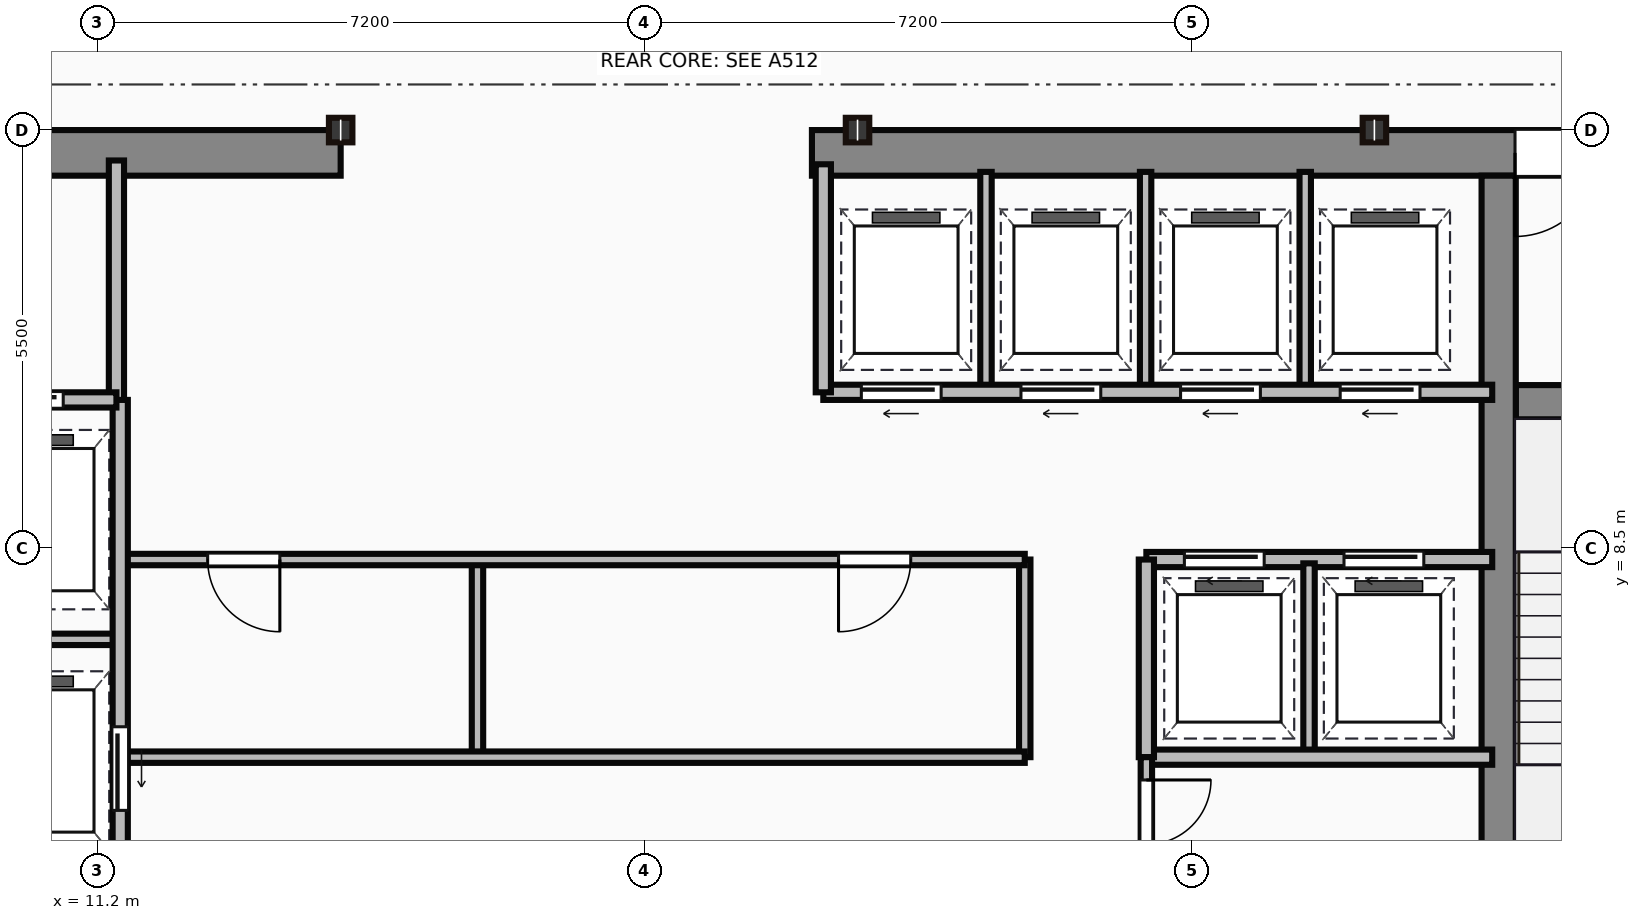
"""IFC4 building model, lengths in metres.
Left out: names, types, materials, properties, quantities, classifications, styles, units other than length and angle.
Written with IfcOpenShell. Run it as: python <this file> out.ifc"""

import sys

from ifc_helpers import new_model, si_unit, direction, frame, frame_2d, origin, origin_2d, place, context, subcontext, project, spatial, rectangle, i_section, extrude, source, transform, mapped, element, fill, save


model = new_model("IFC4")
c1 = context("Model", 3, precision=1e-05, world=origin(), true_north=direction((0.0, 1.0)))
c2 = subcontext(c1, "Body", "Model", "MODEL_VIEW")
j1 = project(units=[si_unit("LENGTHUNIT", "METRE"), si_unit("PLANEANGLEUNIT", "RADIAN")], contexts=[c1])
p1 = place(None, origin())
s1 = spatial("IfcSite", under=j1, at=p1, CompositionType="ELEMENT")
p2 = place(p1, origin())
s2 = spatial("IfcBuilding", under=s1, at=p2, CompositionType="ELEMENT")
p3 = place(p2, frame((0.0, 0.0, 277.05)))
s3 = spatial("IfcBuildingStorey", under=s2, at=p3, CompositionType="ELEMENT", Elevation=277.05)
m1 = source(origin(), c2, "Body", "SweptSolid", [
    extrude(rectangle(XDim=9.1, YDim=0.6, at=frame_2d((4.55, 0.0))), origin(), (0.0, 0.0, 1.0), 3.65),
])
p4 = place(p3, frame((5.3, 13.7, 0.0), z_axis=(0.0, 0.0, 1.0), x_axis=(1.0, 0.0, 0.0)))
e1 = element("IfcWall", 1, at=p4, inside=s3, PredefinedType="SHEAR", context=c2, shape_type="MappedRepresentation", body=[
    mapped(m1, transform((0.0, 0.0, 0.0))),
])
p5 = place(p4, frame((4.1, 0.0, 0.0)))
e2 = element("IfcOpeningElement", 2, at=p5, cuts=e1, PredefinedType="OPENING", context=c2, shape_type="SweptSolid", body=[
    extrude(rectangle(XDim=1.1, YDim=2.15, at=frame_2d((0.55, 1.075))), frame((0.0, 0.31, 0.0), z_axis=(0.0, -1.0, 0.0), x_axis=(1.0, 0.0, 0.0)), (0.0, 0.0, 1.0), 0.62),
])
m2 = source(origin(), c2, "Body", "SweptSolid", [
    extrude(rectangle(XDim=12.6, YDim=0.6, at=frame_2d((6.3, 0.0))), origin(), (0.0, 0.0, 1.0), 3.65),
])
p6 = place(p3, frame((20.6, 13.7, 0.0), z_axis=(0.0, 0.0, 1.0), x_axis=(1.0, 0.0, 0.0)))
e3 = element("IfcWall", 3, at=p6, inside=s3, PredefinedType="SHEAR", context=c2, shape_type="MappedRepresentation", body=[
    mapped(m2, transform((0.0, 0.0, 0.0))),
])
p7 = place(p6, frame((9.25, 0.0, 0.0)))
e4 = element("IfcOpeningElement", 4, at=p7, cuts=e3, PredefinedType="OPENING", context=c2, shape_type="SweptSolid", body=[
    extrude(rectangle(XDim=1.1, YDim=2.15, at=frame_2d((0.55, 1.075))), frame((0.0, 0.31, 0.0), z_axis=(0.0, -1.0, 0.0), x_axis=(1.0, 0.0, 0.0)), (0.0, 0.0, 1.0), 0.62),
])
m3 = source(origin(), c2, "Body", "SweptSolid", [
    extrude(rectangle(XDim=12.5, YDim=0.45, at=frame_2d((6.25, 0.0))), origin(), (0.0, 0.0, 1.0), 3.65),
])
p8 = place(p3, frame((29.635, 0.9, 0.0), z_axis=(0.0, 0.0, 1.0), x_axis=(0.0, 1.0, 0.0)))
e5 = element("IfcWall", 5, at=p8, inside=s3, PredefinedType="SHEAR", context=c2, shape_type="MappedRepresentation", body=[
    mapped(m3, transform((0.0, 0.0, 0.0))),
])
m4 = source(origin(), c2, "Body", "SweptSolid", [
    extrude(rectangle(XDim=3.39, YDim=0.45, at=frame_2d((1.695, 0.0))), origin(), (0.0, 0.0, 1.0), 3.65),
])
p9 = place(p3, frame((29.86, 10.42, 0.0), z_axis=(0.0, 0.0, 1.0), x_axis=(1.0, 0.0, 0.0)))
e6 = element("IfcWall", 6, at=p9, inside=s3, PredefinedType="SHEAR", context=c2, shape_type="MappedRepresentation", body=[
    mapped(m4, transform((0.0, 0.0, 0.0))),
])
p10 = place(p9, frame((1.1, 0.0, 0.0)))
e7 = element("IfcOpeningElement", 7, at=p10, cuts=e6, PredefinedType="OPENING", context=c2, shape_type="SweptSolid", body=[
    extrude(rectangle(XDim=1.1, YDim=2.15, at=frame_2d((0.55, 1.075))), frame((0.0, 0.235, 0.0), z_axis=(0.0, -1.0, 0.0), x_axis=(1.0, 0.0, 0.0)), (0.0, 0.0, 1.0), 0.47),
])
m5 = source(origin(), c2, "Body", "SweptSolid", [
    extrude(i_section(OverallWidth=0.309, OverallDepth=0.323, WebThickness=0.014, FlangeThickness=0.023, at=origin_2d()), origin(), (0.0, 0.0, 1.0), 3.65),
])
for number, where, z_axis, x_axis in (
    (8, (14.4, 14.0, 0.0), (0.0, 0.0, 1.0), (1.0, 0.0, 0.0)),
    (9, (21.2, 14.0, 0.0), (0.0, 0.0, 1.0), (1.0, 0.0, 0.0)),
    (10, (28.0, 14.0, 0.0), (0.0, 0.0, 1.0), (1.0, 0.0, 0.0)),
):
    element("IfcColumn", number, at=place(p3, frame(where, z_axis=z_axis, x_axis=x_axis)), inside=s3, PredefinedType="COLUMN", context=c2, shape_type="MappedRepresentation", body=[
        mapped(m5, transform((0.0, 0.0, 0.0))),
    ])
m6 = source(origin(), c2, "Body", "SweptSolid", [
    extrude(rectangle(XDim=3.18, YDim=0.2, at=frame_2d((1.59, 0.0))), origin(), (0.0, 0.0, 1.0), 3.4),
])
p11 = place(p3, frame((11.45, 10.42, 0.0), z_axis=(0.0, 0.0, 1.0), x_axis=(0.0, 1.0, 0.0)))
e11 = element("IfcWall", 11, at=p11, inside=s3, PredefinedType="PARTITIONING", context=c2, shape_type="MappedRepresentation", body=[
    mapped(m6, transform((0.0, 0.0, 0.0))),
])
m7 = source(origin(), c2, "Body", "SweptSolid", [
    extrude(rectangle(XDim=2.35, YDim=0.2, at=frame_2d((1.175, 0.0))), origin(), (0.0, 0.0, 1.0), 3.4),
])
p12 = place(p3, frame((9.1, 10.45, 0.0), z_axis=(0.0, 0.0, 1.0), x_axis=(1.0, 0.0, 0.0)))
e12 = element("IfcWall", 12, at=p12, inside=s3, PredefinedType="PARTITIONING", context=c2, shape_type="MappedRepresentation", body=[
    mapped(m7, transform((0.0, 0.0, 0.0))),
])
p13 = place(p12, frame((0.55, 0.0, 0.0)))
e13 = element("IfcOpeningElement", 13, at=p13, cuts=e12, PredefinedType="OPENING", context=c2, shape_type="SweptSolid", body=[
    extrude(rectangle(XDim=1.1, YDim=2.15, at=frame_2d((0.55, 1.075))), frame((0.0, 0.11, 0.0), z_axis=(0.0, -1.0, 0.0), x_axis=(1.0, 0.0, 0.0)), (0.0, 0.0, 1.0), 0.22),
])
m8 = source(origin(), c2, "Body", "SweptSolid", [
    extrude(rectangle(XDim=9.6, YDim=0.2, at=frame_2d((4.8, 0.0))), origin(), (0.0, 0.0, 1.0), 3.4),
])
p14 = place(p3, frame((11.5, 0.85, 0.0), z_axis=(0.0, 0.0, 1.0), x_axis=(0.0, 1.0, 0.0)))
e14 = element("IfcWall", 14, at=p14, inside=s3, PredefinedType="PARTITIONING", context=c2, shape_type="MappedRepresentation", body=[
    mapped(m8, transform((0.0, 0.0, 0.0))),
])
p15 = place(p14, frame((4.2, 0.0, 0.0)))
e15 = element("IfcOpeningElement", 15, at=p15, cuts=e14, PredefinedType="OPENING", context=c2, shape_type="SweptSolid", body=[
    extrude(rectangle(XDim=1.1, YDim=2.15, at=frame_2d((0.55, 1.075))), frame((0.0, 0.11, 0.0), z_axis=(0.0, -1.0, 0.0), x_axis=(1.0, 0.0, 0.0)), (0.0, 0.0, 1.0), 0.22),
])
p16 = place(p14, frame((0.9, 0.0, 0.0)))
e16 = element("IfcOpeningElement", 16, at=p16, cuts=e14, PredefinedType="OPENING", context=c2, shape_type="SweptSolid", body=[
    extrude(rectangle(XDim=1.2, YDim=2.15, at=frame_2d((0.6, 1.075))), frame((0.0, 0.11, 0.0), z_axis=(0.0, -1.0, 0.0), x_axis=(1.0, 0.0, 0.0)), (0.0, 0.0, 1.0), 0.22),
])
m9 = source(origin(), c2, "Body", "SweptSolid", [
    extrude(rectangle(XDim=2.4, YDim=0.15, at=frame_2d((1.2, 0.0))), origin(), (0.0, 0.0, 1.0), 3.4),
])
p17 = place(p3, frame((9.1, 7.3, 0.0), z_axis=(0.0, 0.0, 1.0), x_axis=(1.0, 0.0, 0.0)))
e17 = element("IfcWall", 17, at=p17, inside=s3, PredefinedType="PARTITIONING", context=c2, shape_type="MappedRepresentation", body=[
    mapped(m9, transform((0.0, 0.0, 0.0))),
])
m10 = source(origin(), c2, "Body", "SweptSolid", [
    extrude(rectangle(XDim=11.85, YDim=0.15, at=frame_2d((5.925, 0.0))), origin(), (0.0, 0.0, 1.0), 3.4),
])
p18 = place(p3, frame((11.55, 5.75, 0.0), z_axis=(0.0, 0.0, 1.0), x_axis=(1.0, 0.0, 0.0)))
e18 = element("IfcWall", 18, at=p18, inside=s3, PredefinedType="PARTITIONING", context=c2, shape_type="MappedRepresentation", body=[
    mapped(m10, transform((0.0, 0.0, 0.0))),
])
p19 = place(p3, frame((11.55, 8.35, 0.0), z_axis=(0.0, 0.0, 1.0), x_axis=(1.0, 0.0, 0.0)))
e19 = element("IfcWall", 19, at=p19, inside=s3, PredefinedType="PARTITIONING", context=c2, shape_type="MappedRepresentation", body=[
    mapped(m10, transform((0.0, 0.0, 0.0))),
])
p20 = place(p19, frame((1.1, 0.0, 0.0)))
e20 = element("IfcOpeningElement", 20, at=p20, cuts=e19, PredefinedType="OPENING", context=c2, shape_type="SweptSolid", body=[
    extrude(rectangle(XDim=0.95, YDim=2.15, at=frame_2d((0.475, 1.075))), frame((0.0, 0.085, 0.0), z_axis=(0.0, -1.0, 0.0), x_axis=(1.0, 0.0, 0.0)), (0.0, 0.0, 1.0), 0.17),
])
p21 = place(p19, frame((9.4, 0.0, 0.0)))
e21 = element("IfcOpeningElement", 21, at=p21, cuts=e19, PredefinedType="OPENING", context=c2, shape_type="SweptSolid", body=[
    extrude(rectangle(XDim=0.95, YDim=2.15, at=frame_2d((0.475, 1.075))), frame((0.0, 0.085, 0.0), z_axis=(0.0, -1.0, 0.0), x_axis=(1.0, 0.0, 0.0)), (0.0, 0.0, 1.0), 0.17),
])
m11 = source(origin(), c2, "Body", "SweptSolid", [
    extrude(rectangle(XDim=2.6, YDim=0.15, at=frame_2d((1.3, 0.0))), origin(), (0.0, 0.0, 1.0), 3.4),
])
p22 = place(p3, frame((23.4, 5.75, 0.0), z_axis=(0.0, 0.0, 1.0), x_axis=(0.0, 1.0, 0.0)))
e22 = element("IfcWall", 22, at=p22, inside=s3, PredefinedType="PARTITIONING", context=c2, shape_type="MappedRepresentation", body=[
    mapped(m11, transform((0.0, 0.0, 0.0))),
])
m12 = source(origin(), c2, "Body", "SweptSolid", [
    extrude(rectangle(XDim=2.5, YDim=0.15, at=frame_2d((1.25, 0.0))), origin(), (0.0, 0.0, 1.0), 3.4),
])
p23 = place(p3, frame((16.2, 5.8, 0.0), z_axis=(0.0, 0.0, 1.0), x_axis=(0.0, 1.0, 0.0)))
e23 = element("IfcWall", 23, at=p23, inside=s3, PredefinedType="PARTITIONING", context=c2, shape_type="MappedRepresentation", body=[
    mapped(m12, transform((0.0, 0.0, 0.0))),
])
m13 = source(origin(), c2, "Body", "SweptSolid", [
    extrude(rectangle(XDim=8.8, YDim=0.2, at=frame_2d((4.4, 0.0))), origin(), (0.0, 0.0, 1.0), 3.4),
])
p24 = place(p3, frame((20.75, 10.55, 0.0), z_axis=(0.0, 0.0, 1.0), x_axis=(1.0, 0.0, 0.0)))
e24 = element("IfcWall", 24, at=p24, inside=s3, PredefinedType="PARTITIONING", context=c2, shape_type="MappedRepresentation", body=[
    mapped(m13, transform((0.0, 0.0, 0.0))),
])
p25 = place(p24, frame((0.5, 0.0, 0.0)))
e25 = element("IfcOpeningElement", 25, at=p25, cuts=e24, PredefinedType="OPENING", context=c2, shape_type="SweptSolid", body=[
    extrude(rectangle(XDim=1.05, YDim=2.15, at=frame_2d((0.525, 1.075))), frame((0.0, 0.11, 0.0), z_axis=(0.0, -1.0, 0.0), x_axis=(1.0, 0.0, 0.0)), (0.0, 0.0, 1.0), 0.22),
])
p26 = place(p24, frame((2.6, 0.0, 0.0)))
e26 = element("IfcOpeningElement", 26, at=p26, cuts=e24, PredefinedType="OPENING", context=c2, shape_type="SweptSolid", body=[
    extrude(rectangle(XDim=1.05, YDim=2.15, at=frame_2d((0.525, 1.075))), frame((0.0, 0.11, 0.0), z_axis=(0.0, -1.0, 0.0), x_axis=(1.0, 0.0, 0.0)), (0.0, 0.0, 1.0), 0.22),
])
p27 = place(p24, frame((4.7, 0.0, 0.0)))
e27 = element("IfcOpeningElement", 27, at=p27, cuts=e24, PredefinedType="OPENING", context=c2, shape_type="SweptSolid", body=[
    extrude(rectangle(XDim=1.05, YDim=2.15, at=frame_2d((0.525, 1.075))), frame((0.0, 0.11, 0.0), z_axis=(0.0, -1.0, 0.0), x_axis=(1.0, 0.0, 0.0)), (0.0, 0.0, 1.0), 0.22),
])
p28 = place(p24, frame((6.8, 0.0, 0.0)))
e28 = element("IfcOpeningElement", 28, at=p28, cuts=e24, PredefinedType="OPENING", context=c2, shape_type="SweptSolid", body=[
    extrude(rectangle(XDim=1.05, YDim=2.15, at=frame_2d((0.525, 1.075))), frame((0.0, 0.11, 0.0), z_axis=(0.0, -1.0, 0.0), x_axis=(1.0, 0.0, 0.0)), (0.0, 0.0, 1.0), 0.22),
])
m14 = source(origin(), c2, "Body", "SweptSolid", [
    extrude(rectangle(XDim=3.0, YDim=0.2, at=frame_2d((1.5, 0.0))), origin(), (0.0, 0.0, 1.0), 3.4),
])
p29 = place(p3, frame((20.75, 10.55, 0.0), z_axis=(0.0, 0.0, 1.0), x_axis=(0.0, 1.0, 0.0)))
e29 = element("IfcWall", 29, at=p29, inside=s3, PredefinedType="PARTITIONING", context=c2, shape_type="MappedRepresentation", body=[
    mapped(m14, transform((0.0, 0.0, 0.0))),
])
m15 = source(origin(), c2, "Body", "SweptSolid", [
    extrude(rectangle(XDim=2.85, YDim=0.15, at=frame_2d((1.425, 0.0))), origin(), (0.0, 0.0, 1.0), 3.4),
])
for number, where, z_axis, x_axis in (
    (30, (22.89, 10.6, 0.0), (0.0, 0.0, 1.0), (0.0, 1.0, 0.0)),
    (31, (24.99, 10.6, 0.0), (0.0, 0.0, 1.0), (0.0, 1.0, 0.0)),
    (32, (27.09, 10.6, 0.0), (0.0, 0.0, 1.0), (0.0, 1.0, 0.0)),
):
    element("IfcWall", number, at=place(p3, frame(where, z_axis=z_axis, x_axis=x_axis)), inside=s3, PredefinedType="PARTITIONING", context=c2, shape_type="MappedRepresentation", body=[
        mapped(m15, transform((0.0, 0.0, 0.0))),
    ])
m16 = source(origin(), c2, "Body", "SweptSolid", [
    extrude(rectangle(XDim=4.55, YDim=0.2, at=frame_2d((2.275, 0.0))), origin(), (0.0, 0.0, 1.0), 3.4),
])
p30 = place(p3, frame((25.0, 8.35, 0.0), z_axis=(0.0, 0.0, 1.0), x_axis=(1.0, 0.0, 0.0)))
e33 = element("IfcWall", 33, at=p30, inside=s3, PredefinedType="PARTITIONING", context=c2, shape_type="MappedRepresentation", body=[
    mapped(m16, transform((0.0, 0.0, 0.0))),
])
p31 = place(p30, frame((0.5, 0.0, 0.0)))
e34 = element("IfcOpeningElement", 34, at=p31, cuts=e33, PredefinedType="OPENING", context=c2, shape_type="SweptSolid", body=[
    extrude(rectangle(XDim=1.05, YDim=2.15, at=frame_2d((0.525, 1.075))), frame((0.0, 0.11, 0.0), z_axis=(0.0, -1.0, 0.0), x_axis=(1.0, 0.0, 0.0)), (0.0, 0.0, 1.0), 0.22),
])
p32 = place(p30, frame((2.6, 0.0, 0.0)))
e35 = element("IfcOpeningElement", 35, at=p32, cuts=e33, PredefinedType="OPENING", context=c2, shape_type="SweptSolid", body=[
    extrude(rectangle(XDim=1.05, YDim=2.15, at=frame_2d((0.525, 1.075))), frame((0.0, 0.11, 0.0), z_axis=(0.0, -1.0, 0.0), x_axis=(1.0, 0.0, 0.0)), (0.0, 0.0, 1.0), 0.22),
])
p33 = place(p3, frame((25.0, 5.75, 0.0), z_axis=(0.0, 0.0, 1.0), x_axis=(1.0, 0.0, 0.0)))
e36 = element("IfcWall", 36, at=p33, inside=s3, PredefinedType="PARTITIONING", context=c2, shape_type="MappedRepresentation", body=[
    mapped(m16, transform((0.0, 0.0, 0.0))),
])
m17 = source(origin(), c2, "Body", "SweptSolid", [
    extrude(rectangle(XDim=2.6, YDim=0.2, at=frame_2d((1.3, 0.0))), origin(), (0.0, 0.0, 1.0), 3.4),
])
p34 = place(p3, frame((25.0, 5.75, 0.0), z_axis=(0.0, 0.0, 1.0), x_axis=(0.0, 1.0, 0.0)))
e37 = element("IfcWall", 37, at=p34, inside=s3, PredefinedType="PARTITIONING", context=c2, shape_type="MappedRepresentation", body=[
    mapped(m17, transform((0.0, 0.0, 0.0))),
])
p35 = place(p3, frame((27.14, 5.8, 0.0), z_axis=(0.0, 0.0, 1.0), x_axis=(0.0, 1.0, 0.0)))
e38 = element("IfcWall", 38, at=p35, inside=s3, PredefinedType="PARTITIONING", context=c2, shape_type="MappedRepresentation", body=[
    mapped(m12, transform((0.0, 0.0, 0.0))),
])
m18 = source(origin(), c2, "Body", "SweptSolid", [
    extrude(rectangle(XDim=4.9, YDim=0.15, at=frame_2d((2.45, 0.0))), origin(), (0.0, 0.0, 1.0), 3.4),
])
p36 = place(p3, frame((25.0, 0.85, 0.0), z_axis=(0.0, 0.0, 1.0), x_axis=(0.0, 1.0, 0.0)))
e39 = element("IfcWall", 39, at=p36, inside=s3, PredefinedType="PARTITIONING", context=c2, shape_type="MappedRepresentation", body=[
    mapped(m18, transform((0.0, 0.0, 0.0))),
])
p37 = place(p36, frame((2.0, 0.0, 0.0)))
e40 = element("IfcOpeningElement", 40, at=p37, cuts=e39, PredefinedType="OPENING", context=c2, shape_type="SweptSolid", body=[
    extrude(rectangle(XDim=0.95, YDim=2.15, at=frame_2d((0.475, 1.075))), frame((0.0, 0.085, 0.0), z_axis=(0.0, -1.0, 0.0), x_axis=(1.0, 0.0, 0.0)), (0.0, 0.0, 1.0), 0.17),
])
p38 = place(p36, frame((3.75, 0.0, 0.0)))
e41 = element("IfcOpeningElement", 41, at=p38, cuts=e39, PredefinedType="OPENING", context=c2, shape_type="SweptSolid", body=[
    extrude(rectangle(XDim=0.85, YDim=2.15, at=frame_2d((0.425, 1.075))), frame((0.0, 0.085, 0.0), z_axis=(0.0, -1.0, 0.0), x_axis=(1.0, 0.0, 0.0)), (0.0, 0.0, 1.0), 0.17),
])
m19 = source(origin(), c2, "Body", "SweptSolid", [
    extrude(rectangle(XDim=1.1, YDim=2.15, at=frame_2d((0.55, 1.075))), frame((0.0, 0.025, 0.0), z_axis=(0.0, -1.0, 0.0), x_axis=(1.0, 0.0, 0.0)), (0.0, 0.0, 1.0), 0.05),
])
p39 = place(p7, origin())
e42 = element("IfcDoor", 42, at=p39, inside=s3, OperationType="SINGLE_SWING_LEFT", PredefinedType="DOOR", context=c2, shape_type="MappedRepresentation", body=[
    mapped(m19, transform((0.0, 0.0, 0.0))),
])
fill(e4, e42)
p40 = place(p13, origin())
e43 = element("IfcDoor", 43, at=p40, inside=s3, OperationType="SLIDING_TO_LEFT", PredefinedType="DOOR", context=c2, shape_type="MappedRepresentation", body=[
    mapped(m19, transform((0.0, 0.0, 0.0))),
])
fill(e13, e43)
p41 = place(p15, frame((1.1, 0.0, 0.0), z_axis=(0.0, 0.0, 1.0), x_axis=(-1.0, 0.0, 0.0)))
e44 = element("IfcDoor", 44, at=p41, inside=s3, OperationType="SLIDING_TO_LEFT", PredefinedType="DOOR", context=c2, shape_type="MappedRepresentation", body=[
    mapped(m19, transform((0.0, 0.0, 0.0))),
])
fill(e15, e44)
m20 = source(origin(), c2, "Body", "SweptSolid", [
    extrude(rectangle(XDim=0.95, YDim=2.15, at=frame_2d((0.475, 1.075))), frame((0.0, 0.025, 0.0), z_axis=(0.0, -1.0, 0.0), x_axis=(1.0, 0.0, 0.0)), (0.0, 0.0, 1.0), 0.05),
])
p42 = place(p20, origin())
e45 = element("IfcDoor", 45, at=p42, inside=s3, OperationType="SINGLE_SWING_RIGHT", PredefinedType="DOOR", context=c2, shape_type="MappedRepresentation", body=[
    mapped(m20, transform((0.0, 0.0, 0.0))),
])
fill(e20, e45)
p43 = place(p21, origin())
e46 = element("IfcDoor", 46, at=p43, inside=s3, OperationType="SINGLE_SWING_LEFT", PredefinedType="DOOR", context=c2, shape_type="MappedRepresentation", body=[
    mapped(m20, transform((0.0, 0.0, 0.0))),
])
fill(e21, e46)
m21 = source(origin(), c2, "Body", "SweptSolid", [
    extrude(rectangle(XDim=1.05, YDim=2.15, at=frame_2d((0.525, 1.075))), frame((0.0, 0.025, 0.0), z_axis=(0.0, -1.0, 0.0), x_axis=(1.0, 0.0, 0.0)), (0.0, 0.0, 1.0), 0.05),
])
p44 = place(p25, frame((1.05, 0.0, 0.0), z_axis=(0.0, 0.0, 1.0), x_axis=(-1.0, 0.0, 0.0)))
e47 = element("IfcDoor", 47, at=p44, inside=s3, OperationType="SLIDING_TO_LEFT", PredefinedType="DOOR", context=c2, shape_type="MappedRepresentation", body=[
    mapped(m21, transform((0.0, 0.0, 0.0))),
])
fill(e25, e47)
p45 = place(p26, frame((1.05, 0.0, 0.0), z_axis=(0.0, 0.0, 1.0), x_axis=(-1.0, 0.0, 0.0)))
e48 = element("IfcDoor", 48, at=p45, inside=s3, OperationType="SLIDING_TO_LEFT", PredefinedType="DOOR", context=c2, shape_type="MappedRepresentation", body=[
    mapped(m21, transform((0.0, 0.0, 0.0))),
])
fill(e26, e48)
p46 = place(p27, frame((1.05, 0.0, 0.0), z_axis=(0.0, 0.0, 1.0), x_axis=(-1.0, 0.0, 0.0)))
e49 = element("IfcDoor", 49, at=p46, inside=s3, OperationType="SLIDING_TO_LEFT", PredefinedType="DOOR", context=c2, shape_type="MappedRepresentation", body=[
    mapped(m21, transform((0.0, 0.0, 0.0))),
])
fill(e27, e49)
p47 = place(p28, frame((1.05, 0.0, 0.0), z_axis=(0.0, 0.0, 1.0), x_axis=(-1.0, 0.0, 0.0)))
e50 = element("IfcDoor", 50, at=p47, inside=s3, OperationType="SLIDING_TO_LEFT", PredefinedType="DOOR", context=c2, shape_type="MappedRepresentation", body=[
    mapped(m21, transform((0.0, 0.0, 0.0))),
])
fill(e28, e50)
p48 = place(p31, origin())
e51 = element("IfcDoor", 51, at=p48, inside=s3, OperationType="SLIDING_TO_LEFT", PredefinedType="DOOR", context=c2, shape_type="MappedRepresentation", body=[
    mapped(m21, transform((0.0, 0.0, 0.0))),
])
fill(e34, e51)
p49 = place(p32, origin())
e52 = element("IfcDoor", 52, at=p49, inside=s3, OperationType="SLIDING_TO_LEFT", PredefinedType="DOOR", context=c2, shape_type="MappedRepresentation", body=[
    mapped(m21, transform((0.0, 0.0, 0.0))),
])
fill(e35, e52)
m22 = source(origin(), c2, "Body", "SweptSolid", [
    extrude(rectangle(XDim=0.85, YDim=2.15, at=frame_2d((0.425, 1.075))), frame((0.0, 0.025, 0.0), z_axis=(0.0, -1.0, 0.0), x_axis=(1.0, 0.0, 0.0)), (0.0, 0.0, 1.0), 0.05),
])
p50 = place(p38, origin())
e53 = element("IfcDoor", 53, at=p50, inside=s3, OperationType="SINGLE_SWING_RIGHT", PredefinedType="DOOR", context=c2, shape_type="MappedRepresentation", body=[
    mapped(m22, transform((0.0, 0.0, 0.0))),
])
fill(e41, e53)
save(model, sys.argv[1])
